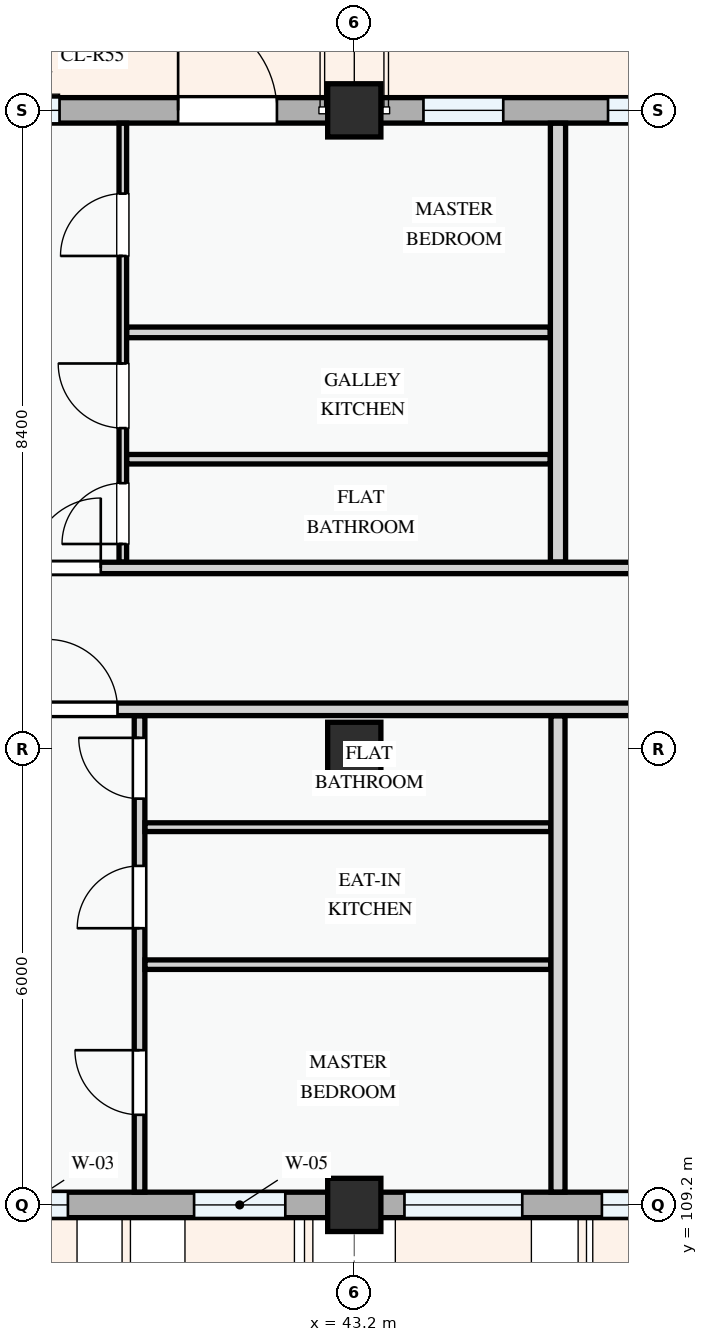
"""IFC4 building model, lengths in metres.
Left out: names, types, materials, properties, quantities, classifications, styles, units other than length and angle.
Written with IfcOpenShell. Run it as: python <this file> out.ifc"""

import sys

from ifc_helpers import new_model, si_unit, direction, frame, frame_2d, origin, origin_2d, place, context, subcontext, project, spatial, rectangle, extrude, element, fill, save


model = new_model("IFC4")
c1 = context("Model", 3, precision=1e-05, world=origin(), true_north=direction((0.0, 1.0)))
c2 = subcontext(c1, "Body", "Model", "MODEL_VIEW")
j1 = project(units=[si_unit("LENGTHUNIT", "METRE"), si_unit("PLANEANGLEUNIT", "RADIAN")], contexts=[c1])
p1 = place(None, origin())
s1 = spatial("IfcSite", under=j1, at=p1, CompositionType="ELEMENT")
p2 = place(p1, origin())
s2 = spatial("IfcBuilding", under=s1, at=p2, CompositionType="ELEMENT")
p3 = place(p2, frame((0.0, 0.0, 18.0)))
s3 = spatial("IfcBuildingStorey", under=s2, at=p3, CompositionType="ELEMENT", Elevation=18.0)
for number, where, z_axis, x_axis in (
    (1, (43.2, 109.2, 0.0), (0.0, 0.0, 1.0), (1.0, 0.0, 0.0)),
    (2, (43.2, 115.2, 0.0), (0.0, 0.0, 1.0), (1.0, 0.0, 0.0)),
    (3, (43.2, 123.6, 0.0), (0.0, 0.0, 1.0), (1.0, 0.0, 0.0)),
):
    element("IfcColumn", number, at=place(p3, frame(where, z_axis=z_axis, x_axis=x_axis)), inside=s3, PredefinedType="COLUMN", context=c2, shape_type="SweptSolid", body=[
        extrude(rectangle(XDim=0.7, YDim=0.7, at=origin_2d()), origin(), (0.0, 0.0, 1.0), 3.3),
    ])
p4 = place(p3, frame((37.2, 109.2, 0.0), z_axis=(0.0, 0.0, 1.0), x_axis=(1.0, 0.0, 0.0)))
e4 = element("IfcWall", 4, at=p4, inside=s3, PredefinedType="STANDARD", context=c2, shape_type="SweptSolid", body=[
    extrude(rectangle(XDim=6.0, YDim=0.335, at=frame_2d((3.0, 0.0))), origin(), (0.0, 0.0, 1.0), 2.475),
])
p5 = place(p4, frame((1.133, 0.0, 0.78)))
e5 = element("IfcOpeningElement", 5, at=p5, cuts=e4, PredefinedType="OPENING", context=c2, shape_type="SweptSolid", body=[
    extrude(rectangle(XDim=1.1, YDim=1.3, at=frame_2d((0.55, 0.65))), frame((0.0, 0.177, 0.0), z_axis=(0.0, -1.0, 0.0), x_axis=(1.0, 0.0, 0.0)), (0.0, 0.0, 1.0), 0.355),
])
p6 = place(p4, frame((3.893, 0.0, 0.78)))
e6 = element("IfcOpeningElement", 6, at=p6, cuts=e4, PredefinedType="OPENING", context=c2, shape_type="SweptSolid", body=[
    extrude(rectangle(XDim=1.2, YDim=1.5, at=frame_2d((0.6, 0.75))), frame((0.0, 0.177, 0.0), z_axis=(0.0, -1.0, 0.0), x_axis=(1.0, 0.0, 0.0)), (0.0, 0.0, 1.0), 0.355),
])
p7 = place(p3, frame((43.2, 109.2, 0.0), z_axis=(0.0, 0.0, 1.0), x_axis=(1.0, 0.0, 0.0)))
e7 = element("IfcWall", 7, at=p7, inside=s3, PredefinedType="STANDARD", context=c2, shape_type="SweptSolid", body=[
    extrude(rectangle(XDim=8.4, YDim=0.335, at=frame_2d((4.2, 0.0))), origin(), (0.0, 0.0, 1.0), 2.375),
])
p8 = place(p7, frame((0.66, 0.0, 0.78)))
e8 = element("IfcOpeningElement", 8, at=p8, cuts=e7, PredefinedType="OPENING", context=c2, shape_type="SweptSolid", body=[
    extrude(rectangle(XDim=1.55, YDim=1.4, at=frame_2d((0.775, 0.7))), frame((0.0, 0.177, 0.0), z_axis=(0.0, -1.0, 0.0), x_axis=(1.0, 0.0, 0.0)), (0.0, 0.0, 1.0), 0.355),
])
p9 = place(p7, frame((3.258, 0.0, 0.78)))
e9 = element("IfcOpeningElement", 9, at=p9, cuts=e7, PredefinedType="OPENING", context=c2, shape_type="SweptSolid", body=[
    extrude(rectangle(XDim=1.68, YDim=1.46, at=frame_2d((0.84, 0.73))), frame((0.0, 0.177, 0.0), z_axis=(0.0, -1.0, 0.0), x_axis=(1.0, 0.0, 0.0)), (0.0, 0.0, 1.0), 0.355),
])
p10 = place(p7, frame((6.343, 0.0, 0.78)))
e10 = element("IfcOpeningElement", 10, at=p10, cuts=e7, PredefinedType="OPENING", context=c2, shape_type="SweptSolid", body=[
    extrude(rectangle(XDim=0.9, YDim=1.2, at=frame_2d((0.45, 0.6))), frame((0.0, 0.177, 0.0), z_axis=(0.0, -1.0, 0.0), x_axis=(1.0, 0.0, 0.0)), (0.0, 0.0, 1.0), 0.355),
])
p11 = place(p3, frame((51.6, 123.6, 0.0), z_axis=(0.0, 0.0, 1.0), x_axis=(-1.0, 0.0, 0.0)))
e11 = element("IfcWall", 11, at=p11, inside=s3, PredefinedType="STANDARD", context=c2, shape_type="SweptSolid", body=[
    extrude(rectangle(XDim=8.4, YDim=0.335, at=frame_2d((4.2, 0.0))), origin(), (0.0, 0.0, 1.0), 2.375),
])
p12 = place(p11, frame((2.053, 0.0, 0.0)))
e12 = element("IfcOpeningElement", 12, at=p12, cuts=e11, PredefinedType="OPENING", context=c2, shape_type="SweptSolid", body=[
    extrude(rectangle(XDim=1.25, YDim=2.2, at=frame_2d((0.625, 1.1))), frame((0.0, 0.177, 0.0), z_axis=(0.0, -1.0, 0.0), x_axis=(1.0, 0.0, 0.0)), (0.0, 0.0, 1.0), 0.355),
])
p13 = place(p11, frame((0.507, 0.0, 0.78)))
e13 = element("IfcOpeningElement", 13, at=p13, cuts=e11, PredefinedType="OPENING", context=c2, shape_type="SweptSolid", body=[
    extrude(rectangle(XDim=0.9, YDim=1.2, at=frame_2d((0.45, 0.6))), frame((0.0, 0.177, 0.0), z_axis=(0.0, -1.0, 0.0), x_axis=(1.0, 0.0, 0.0)), (0.0, 0.0, 1.0), 0.355),
])
p14 = place(p11, frame((4.012, 0.0, 0.78)))
e14 = element("IfcOpeningElement", 14, at=p14, cuts=e11, PredefinedType="OPENING", context=c2, shape_type="SweptSolid", body=[
    extrude(rectangle(XDim=1.05, YDim=1.2, at=frame_2d((0.525, 0.6))), frame((0.0, 0.177, 0.0), z_axis=(0.0, -1.0, 0.0), x_axis=(1.0, 0.0, 0.0)), (0.0, 0.0, 1.0), 0.355),
])
p15 = place(p11, frame((6.44, 0.0, 0.78)))
e15 = element("IfcOpeningElement", 15, at=p15, cuts=e11, PredefinedType="OPENING", context=c2, shape_type="SweptSolid", body=[
    extrude(rectangle(XDim=1.05, YDim=1.2, at=frame_2d((0.525, 0.6))), frame((0.0, 0.177, 0.0), z_axis=(0.0, -1.0, 0.0), x_axis=(1.0, 0.0, 0.0)), (0.0, 0.0, 1.0), 0.355),
])
p16 = place(p3, frame((43.2, 123.6, 0.0), z_axis=(0.0, 0.0, 1.0), x_axis=(-1.0, 0.0, 0.0)))
e16 = element("IfcWall", 16, at=p16, inside=s3, PredefinedType="STANDARD", context=c2, shape_type="SweptSolid", body=[
    extrude(rectangle(XDim=6.0, YDim=0.335, at=frame_2d((3.0, 0.0))), origin(), (0.0, 0.0, 1.0), 2.475),
])
p17 = place(p16, frame((1.018, 0.0, 0.0)))
e17 = element("IfcOpeningElement", 17, at=p17, cuts=e16, PredefinedType="OPENING", context=c2, shape_type="SweptSolid", body=[
    extrude(rectangle(XDim=1.3, YDim=2.15, at=frame_2d((0.65, 1.075))), frame((0.0, 0.177, 0.0), z_axis=(0.0, -1.0, 0.0), x_axis=(1.0, 0.0, 0.0)), (0.0, 0.0, 1.0), 0.355),
])
p18 = place(p16, frame((3.878, 0.0, 0.78)))
e18 = element("IfcOpeningElement", 18, at=p18, cuts=e16, PredefinedType="OPENING", context=c2, shape_type="SweptSolid", body=[
    extrude(rectangle(XDim=1.1, YDim=1.3, at=frame_2d((0.55, 0.65))), frame((0.0, 0.177, 0.0), z_axis=(0.0, -1.0, 0.0), x_axis=(1.0, 0.0, 0.0)), (0.0, 0.0, 1.0), 0.355),
])
p19 = place(p3, frame((40.375, 109.369, 0.0), z_axis=(0.0, 0.0, 1.0), x_axis=(0.0, 1.0, 0.0)))
e19 = element("IfcWall", 19, at=p19, inside=s3, PredefinedType="PARTITIONING", context=c2, shape_type="SweptSolid", body=[
    extrude(rectangle(XDim=6.266, YDim=0.14, at=frame_2d((3.133, 0.0))), origin(), (0.0, 0.0, 1.0), 3.0),
])
p20 = place(p19, frame((1.016, 0.0, 0.0)))
e20 = element("IfcOpeningElement", 20, at=p20, cuts=e19, PredefinedType="OPENING", context=c2, shape_type="SweptSolid", body=[
    extrude(rectangle(XDim=0.85, YDim=2.1, at=frame_2d((0.425, 1.05))), frame((0.0, 0.08, 0.0), z_axis=(0.0, -1.0, 0.0), x_axis=(1.0, 0.0, 0.0)), (0.0, 0.0, 1.0), 0.16),
])
p21 = place(p19, frame((3.471, 0.0, 0.0)))
e21 = element("IfcOpeningElement", 21, at=p21, cuts=e19, PredefinedType="OPENING", context=c2, shape_type="SweptSolid", body=[
    extrude(rectangle(XDim=0.82, YDim=2.08, at=frame_2d((0.41, 1.04))), frame((0.0, 0.08, 0.0), z_axis=(0.0, -1.0, 0.0), x_axis=(1.0, 0.0, 0.0)), (0.0, 0.0, 1.0), 0.16),
])
p22 = place(p19, frame((5.175, 0.0, 0.0)))
e22 = element("IfcOpeningElement", 22, at=p22, cuts=e19, PredefinedType="OPENING", context=c2, shape_type="SweptSolid", body=[
    extrude(rectangle(XDim=0.8, YDim=2.1, at=frame_2d((0.4, 1.05))), frame((0.0, 0.08, 0.0), z_axis=(0.0, -1.0, 0.0), x_axis=(1.0, 0.0, 0.0)), (0.0, 0.0, 1.0), 0.16),
])
p23 = place(p3, frame((40.447, 112.361, 0.0), z_axis=(0.0, 0.0, 1.0), x_axis=(1.0, 0.0, 0.0)))
e23 = element("IfcWall", 23, at=p23, inside=s3, PredefinedType="PARTITIONING", context=c2, shape_type="SweptSolid", body=[
    extrude(rectangle(XDim=5.338, YDim=0.125, at=frame_2d((2.669, 0.0))), origin(), (0.0, 0.0, 1.0), 3.0),
])
p24 = place(p3, frame((40.447, 114.17, 0.0), z_axis=(0.0, 0.0, 1.0), x_axis=(1.0, 0.0, 0.0)))
e24 = element("IfcWall", 24, at=p24, inside=s3, PredefinedType="PARTITIONING", context=c2, shape_type="SweptSolid", body=[
    extrude(rectangle(XDim=5.338, YDim=0.115, at=frame_2d((2.669, 0.0))), origin(), (0.0, 0.0, 1.0), 3.0),
])
p25 = place(p3, frame((40.155, 117.657, 0.0), z_axis=(0.0, 0.0, 1.0), x_axis=(0.0, 1.0, 0.0)))
e25 = element("IfcWall", 25, at=p25, inside=s3, PredefinedType="PARTITIONING", context=c2, shape_type="SweptSolid", body=[
    extrude(rectangle(XDim=5.773, YDim=0.1, at=frame_2d((2.887, 0.0))), origin(), (0.0, 0.0, 1.0), 3.0),
])
p26 = place(p25, frame((0.238, 0.0, 0.0)))
e26 = element("IfcOpeningElement", 26, at=p26, cuts=e25, PredefinedType="OPENING", context=c2, shape_type="SweptSolid", body=[
    extrude(rectangle(XDim=0.8, YDim=2.1, at=frame_2d((0.4, 1.05))), frame((0.0, 0.06, 0.0), z_axis=(0.0, -1.0, 0.0), x_axis=(1.0, 0.0, 0.0)), (0.0, 0.0, 1.0), 0.12),
])
p27 = place(p25, frame((1.763, 0.0, 0.0)))
e27 = element("IfcOpeningElement", 27, at=p27, cuts=e25, PredefinedType="OPENING", context=c2, shape_type="SweptSolid", body=[
    extrude(rectangle(XDim=0.85, YDim=2.1, at=frame_2d((0.425, 1.05))), frame((0.0, 0.06, 0.0), z_axis=(0.0, -1.0, 0.0), x_axis=(1.0, 0.0, 0.0)), (0.0, 0.0, 1.0), 0.12),
])
p28 = place(p25, frame((4.028, 0.0, 0.0)))
e28 = element("IfcOpeningElement", 28, at=p28, cuts=e25, PredefinedType="OPENING", context=c2, shape_type="SweptSolid", body=[
    extrude(rectangle(XDim=0.82, YDim=2.08, at=frame_2d((0.41, 1.04))), frame((0.0, 0.06, 0.0), z_axis=(0.0, -1.0, 0.0), x_axis=(1.0, 0.0, 0.0)), (0.0, 0.0, 1.0), 0.12),
])
p29 = place(p3, frame((40.207, 120.679, 0.0), z_axis=(0.0, 0.0, 1.0), x_axis=(1.0, 0.0, 0.0)))
e29 = element("IfcWall", 29, at=p29, inside=s3, PredefinedType="PARTITIONING", context=c2, shape_type="SweptSolid", body=[
    extrude(rectangle(XDim=5.571, YDim=0.14, at=frame_2d((2.786, 0.0))), origin(), (0.0, 0.0, 1.0), 3.0),
])
p30 = place(p3, frame((40.207, 119.01, 0.0), z_axis=(0.0, 0.0, 1.0), x_axis=(1.0, 0.0, 0.0)))
e30 = element("IfcWall", 30, at=p30, inside=s3, PredefinedType="PARTITIONING", context=c2, shape_type="SweptSolid", body=[
    extrude(rectangle(XDim=5.571, YDim=0.125, at=frame_2d((2.786, 0.0))), origin(), (0.0, 0.0, 1.0), 3.0),
])
p31 = place(p3, frame((45.88, 109.369, 0.0), z_axis=(0.0, 0.0, 1.0), x_axis=(0.0, 1.0, 0.0)))
e31 = element("IfcWall", 31, at=p31, inside=s3, PredefinedType="PARTITIONING", context=c2, shape_type="SweptSolid", body=[
    extrude(rectangle(XDim=6.266, YDim=0.185, at=frame_2d((3.133, 0.0))), origin(), (0.0, 0.0, 1.0), 3.0),
])
p32 = place(p3, frame((45.88, 117.657, 0.0), z_axis=(0.0, 0.0, 1.0), x_axis=(0.0, 1.0, 0.0)))
e32 = element("IfcWall", 32, at=p32, inside=s3, PredefinedType="PARTITIONING", context=c2, shape_type="SweptSolid", body=[
    extrude(rectangle(XDim=5.773, YDim=0.2, at=frame_2d((2.887, 0.0))), origin(), (0.0, 0.0, 1.0), 3.0),
])
p33 = place(p3, frame((25.15, 115.72, 0.0), z_axis=(0.0, 0.0, 1.0), x_axis=(1.0, 0.0, 0.0)))
e33 = element("IfcWall", 33, at=p33, inside=s3, PredefinedType="PARTITIONING", context=c2, shape_type="SweptSolid", body=[
    extrude(rectangle(XDim=32.281, YDim=0.165, at=frame_2d((16.14, 0.0))), origin(), (0.0, 0.0, 1.0), 3.0),
])
p34 = place(p33, frame((0.25, 0.0, 0.0)))
e34 = element("IfcOpeningElement", 34, at=p34, cuts=e33, PredefinedType="OPENING", context=c2, shape_type="SweptSolid", body=[
    extrude(rectangle(XDim=0.96, YDim=2.12, at=frame_2d((0.48, 1.06))), frame((0.0, 0.093, 0.0), z_axis=(0.0, -1.0, 0.0), x_axis=(1.0, 0.0, 0.0)), (0.0, 0.0, 1.0), 0.185),
])
p35 = place(p33, frame((14.015, 0.0, 0.0)))
e35 = element("IfcOpeningElement", 35, at=p35, cuts=e33, PredefinedType="OPENING", context=c2, shape_type="SweptSolid", body=[
    extrude(rectangle(XDim=0.92, YDim=2.1, at=frame_2d((0.46, 1.05))), frame((0.0, 0.093, 0.0), z_axis=(0.0, -1.0, 0.0), x_axis=(1.0, 0.0, 0.0)), (0.0, 0.0, 1.0), 0.185),
])
p36 = place(p33, frame((21.739, 0.0, 0.0)))
e36 = element("IfcOpeningElement", 36, at=p36, cuts=e33, PredefinedType="OPENING", context=c2, shape_type="SweptSolid", body=[
    extrude(rectangle(XDim=0.92, YDim=2.1, at=frame_2d((0.46, 1.05))), frame((0.0, 0.093, 0.0), z_axis=(0.0, -1.0, 0.0), x_axis=(1.0, 0.0, 0.0)), (0.0, 0.0, 1.0), 0.185),
])
p37 = place(p3, frame((22.66, 117.58, 0.0), z_axis=(0.0, 0.0, 1.0), x_axis=(1.0, 0.0, 0.0)))
e37 = element("IfcWall", 37, at=p37, inside=s3, PredefinedType="PARTITIONING", context=c2, shape_type="SweptSolid", body=[
    extrude(rectangle(XDim=34.88, YDim=0.15, at=frame_2d((17.44, 0.0))), origin(), (0.0, 0.0, 1.0), 3.0),
])
p38 = place(p37, frame((2.74, 0.0, 0.0)))
e38 = element("IfcOpeningElement", 38, at=p38, cuts=e37, PredefinedType="OPENING", context=c2, shape_type="SweptSolid", body=[
    extrude(rectangle(XDim=0.92, YDim=2.1, at=frame_2d((0.46, 1.05))), frame((0.0, 0.085, 0.0), z_axis=(0.0, -1.0, 0.0), x_axis=(1.0, 0.0, 0.0)), (0.0, 0.0, 1.0), 0.17),
])
p39 = place(p37, frame((16.285, 0.0, 0.0)))
e39 = element("IfcOpeningElement", 39, at=p39, cuts=e37, PredefinedType="OPENING", context=c2, shape_type="SweptSolid", body=[
    extrude(rectangle(XDim=0.92, YDim=2.1, at=frame_2d((0.46, 1.05))), frame((0.0, 0.085, 0.0), z_axis=(0.0, -1.0, 0.0), x_axis=(1.0, 0.0, 0.0)), (0.0, 0.0, 1.0), 0.17),
])
p40 = place(p37, frame((24.263, 0.0, 0.0)))
e40 = element("IfcOpeningElement", 40, at=p40, cuts=e37, PredefinedType="OPENING", context=c2, shape_type="SweptSolid", body=[
    extrude(rectangle(XDim=0.96, YDim=2.12, at=frame_2d((0.48, 1.06))), frame((0.0, 0.085, 0.0), z_axis=(0.0, -1.0, 0.0), x_axis=(1.0, 0.0, 0.0)), (0.0, 0.0, 1.0), 0.17),
])
p41 = place(p5, origin())
e41 = element("IfcWindow", 41, at=p41, inside=s3, PartitioningType="SINGLE_PANEL", PredefinedType="WINDOW", context=c2, shape_type="SweptSolid", body=[
    extrude(rectangle(XDim=1.1, YDim=1.3, at=frame_2d((0.55, 0.65))), frame((0.0, 0.03, 0.0), z_axis=(0.0, -1.0, 0.0), x_axis=(1.0, 0.0, 0.0)), (0.0, 0.0, 1.0), 0.06),
])
fill(e5, e41)
p42 = place(p6, origin())
e42 = element("IfcWindow", 42, at=p42, inside=s3, PartitioningType="SINGLE_PANEL", PredefinedType="WINDOW", context=c2, shape_type="SweptSolid", body=[
    extrude(rectangle(XDim=1.2, YDim=1.5, at=frame_2d((0.6, 0.75))), frame((0.0, 0.03, 0.0), z_axis=(0.0, -1.0, 0.0), x_axis=(1.0, 0.0, 0.0)), (0.0, 0.0, 1.0), 0.06),
])
fill(e6, e42)
p43 = place(p8, origin())
e43 = element("IfcWindow", 43, at=p43, inside=s3, PartitioningType="SINGLE_PANEL", PredefinedType="WINDOW", context=c2, shape_type="SweptSolid", body=[
    extrude(rectangle(XDim=1.55, YDim=1.4, at=frame_2d((0.775, 0.7))), frame((0.0, 0.03, 0.0), z_axis=(0.0, -1.0, 0.0), x_axis=(1.0, 0.0, 0.0)), (0.0, 0.0, 1.0), 0.06),
])
fill(e8, e43)
p44 = place(p9, origin())
e44 = element("IfcWindow", 44, at=p44, inside=s3, PartitioningType="DOUBLE_PANEL_VERTICAL", PredefinedType="WINDOW", context=c2, shape_type="SweptSolid", body=[
    extrude(rectangle(XDim=1.68, YDim=1.46, at=frame_2d((0.84, 0.73))), frame((0.0, 0.03, 0.0), z_axis=(0.0, -1.0, 0.0), x_axis=(1.0, 0.0, 0.0)), (0.0, 0.0, 1.0), 0.06),
])
fill(e9, e44)
p45 = place(p14, origin())
e45 = element("IfcWindow", 45, at=p45, inside=s3, PartitioningType="SINGLE_PANEL", PredefinedType="WINDOW", context=c2, shape_type="SweptSolid", body=[
    extrude(rectangle(XDim=1.05, YDim=1.2, at=frame_2d((0.525, 0.6))), frame((0.0, 0.03, 0.0), z_axis=(0.0, -1.0, 0.0), x_axis=(1.0, 0.0, 0.0)), (0.0, 0.0, 1.0), 0.06),
])
fill(e14, e45)
p46 = place(p15, origin())
e46 = element("IfcWindow", 46, at=p46, inside=s3, PartitioningType="SINGLE_PANEL", PredefinedType="WINDOW", context=c2, shape_type="SweptSolid", body=[
    extrude(rectangle(XDim=1.05, YDim=1.2, at=frame_2d((0.525, 0.6))), frame((0.0, 0.03, 0.0), z_axis=(0.0, -1.0, 0.0), x_axis=(1.0, 0.0, 0.0)), (0.0, 0.0, 1.0), 0.06),
])
fill(e15, e46)
p47 = place(p17, frame((1.3, 0.0, 0.0), z_axis=(0.0, 0.0, 1.0), x_axis=(-1.0, 0.0, 0.0)))
e47 = element("IfcDoor", 47, at=p47, inside=s3, OperationType="SINGLE_SWING_LEFT", PredefinedType="DOOR", context=c2, shape_type="SweptSolid", body=[
    extrude(rectangle(XDim=1.3, YDim=2.15, at=frame_2d((0.65, 1.075))), frame((0.0, 0.025, 0.0), z_axis=(0.0, -1.0, 0.0), x_axis=(1.0, 0.0, 0.0)), (0.0, 0.0, 1.0), 0.05),
])
fill(e17, e47)
p48 = place(p18, origin())
e48 = element("IfcWindow", 48, at=p48, inside=s3, PartitioningType="SINGLE_PANEL", PredefinedType="WINDOW", context=c2, shape_type="SweptSolid", body=[
    extrude(rectangle(XDim=1.1, YDim=1.3, at=frame_2d((0.55, 0.65))), frame((0.0, 0.03, 0.0), z_axis=(0.0, -1.0, 0.0), x_axis=(1.0, 0.0, 0.0)), (0.0, 0.0, 1.0), 0.06),
])
fill(e18, e48)
p49 = place(p20, origin())
e49 = element("IfcDoor", 49, at=p49, inside=s3, OperationType="SINGLE_SWING_RIGHT", PredefinedType="DOOR", context=c2, shape_type="SweptSolid", body=[
    extrude(rectangle(XDim=0.85, YDim=2.1, at=frame_2d((0.425, 1.05))), frame((0.0, 0.025, 0.0), z_axis=(0.0, -1.0, 0.0), x_axis=(1.0, 0.0, 0.0)), (0.0, 0.0, 1.0), 0.05),
])
fill(e20, e49)
p50 = place(p21, origin())
e50 = element("IfcDoor", 50, at=p50, inside=s3, OperationType="SINGLE_SWING_LEFT", PredefinedType="DOOR", context=c2, shape_type="SweptSolid", body=[
    extrude(rectangle(XDim=0.82, YDim=2.08, at=frame_2d((0.41, 1.04))), frame((0.0, 0.025, 0.0), z_axis=(0.0, -1.0, 0.0), x_axis=(1.0, 0.0, 0.0)), (0.0, 0.0, 1.0), 0.05),
])
fill(e21, e50)
p51 = place(p22, origin())
e51 = element("IfcDoor", 51, at=p51, inside=s3, OperationType="SINGLE_SWING_RIGHT", PredefinedType="DOOR", context=c2, shape_type="SweptSolid", body=[
    extrude(rectangle(XDim=0.8, YDim=2.1, at=frame_2d((0.4, 1.05))), frame((0.0, 0.025, 0.0), z_axis=(0.0, -1.0, 0.0), x_axis=(1.0, 0.0, 0.0)), (0.0, 0.0, 1.0), 0.05),
])
fill(e22, e51)
p52 = place(p26, origin())
e52 = element("IfcDoor", 52, at=p52, inside=s3, OperationType="SINGLE_SWING_LEFT", PredefinedType="DOOR", context=c2, shape_type="SweptSolid", body=[
    extrude(rectangle(XDim=0.8, YDim=2.1, at=frame_2d((0.4, 1.05))), frame((0.0, 0.025, 0.0), z_axis=(0.0, -1.0, 0.0), x_axis=(1.0, 0.0, 0.0)), (0.0, 0.0, 1.0), 0.05),
])
fill(e26, e52)
p53 = place(p27, origin())
e53 = element("IfcDoor", 53, at=p53, inside=s3, OperationType="SINGLE_SWING_RIGHT", PredefinedType="DOOR", context=c2, shape_type="SweptSolid", body=[
    extrude(rectangle(XDim=0.85, YDim=2.1, at=frame_2d((0.425, 1.05))), frame((0.0, 0.025, 0.0), z_axis=(0.0, -1.0, 0.0), x_axis=(1.0, 0.0, 0.0)), (0.0, 0.0, 1.0), 0.05),
])
fill(e27, e53)
p54 = place(p28, origin())
e54 = element("IfcDoor", 54, at=p54, inside=s3, OperationType="SINGLE_SWING_LEFT", PredefinedType="DOOR", context=c2, shape_type="SweptSolid", body=[
    extrude(rectangle(XDim=0.82, YDim=2.08, at=frame_2d((0.41, 1.04))), frame((0.0, 0.025, 0.0), z_axis=(0.0, -1.0, 0.0), x_axis=(1.0, 0.0, 0.0)), (0.0, 0.0, 1.0), 0.05),
])
fill(e28, e54)
p55 = place(p35, origin())
e55 = element("IfcDoor", 55, at=p55, inside=s3, OperationType="SINGLE_SWING_LEFT", PredefinedType="DOOR", context=c2, shape_type="SweptSolid", body=[
    extrude(rectangle(XDim=0.92, YDim=2.1, at=frame_2d((0.46, 1.05))), frame((0.0, 0.025, 0.0), z_axis=(0.0, -1.0, 0.0), x_axis=(1.0, 0.0, 0.0)), (0.0, 0.0, 1.0), 0.05),
])
fill(e35, e55)
p56 = place(p39, origin())
e56 = element("IfcDoor", 56, at=p56, inside=s3, OperationType="SINGLE_SWING_RIGHT", PredefinedType="DOOR", context=c2, shape_type="SweptSolid", body=[
    extrude(rectangle(XDim=0.92, YDim=2.1, at=frame_2d((0.46, 1.05))), frame((0.0, 0.025, 0.0), z_axis=(0.0, -1.0, 0.0), x_axis=(1.0, 0.0, 0.0)), (0.0, 0.0, 1.0), 0.05),
])
fill(e39, e56)
save(model, sys.argv[1])
